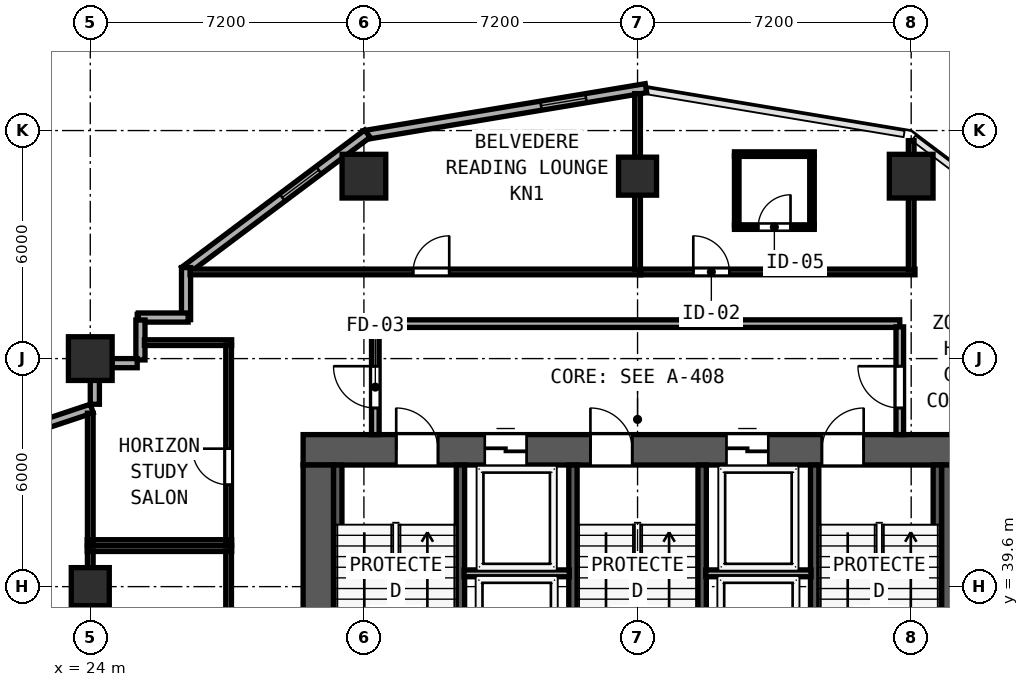
"""IFC4 building model, lengths in metres.
Left out: names, types, materials, properties, quantities, classifications, styles, units other than length and angle.
Written with IfcOpenShell. Run it as: python <this file> out.ifc"""

import sys

from ifc_helpers import new_model, si_unit, direction, frame, frame_2d, origin, origin_2d, place, context, subcontext, project, spatial, rectangle, hollow_rectangle, extrude, element, fill, save


model = new_model("IFC4")
c1 = context("Model", 3, precision=1e-05, world=origin(), true_north=direction((0.0, 1.0)))
c2 = subcontext(c1, "Body", "Model", "MODEL_VIEW")
j1 = project(units=[si_unit("LENGTHUNIT", "METRE"), si_unit("PLANEANGLEUNIT", "RADIAN")], contexts=[c1])
p1 = place(None, origin())
s1 = spatial("IfcSite", under=j1, at=p1, CompositionType="ELEMENT")
p2 = place(p1, origin())
s2 = spatial("IfcBuilding", under=s1, at=p2, CompositionType="ELEMENT")
p3 = place(p2, frame((0.0, 0.0, 70.4)))
s3 = spatial("IfcBuildingStorey", under=s2, at=p3, CompositionType="ELEMENT", Elevation=70.4)
p4 = place(p3, frame((29.6, 43.2, 0.0), z_axis=(0.0, 0.0, 1.0), x_axis=(1.0, 0.0, 0.0)))
e1 = element("IfcWall", 1, at=p4, inside=s3, PredefinedType="SHEAR", context=c2, shape_type="SweptSolid", body=[
    extrude(rectangle(XDim=17.6, YDim=0.8, at=frame_2d((8.8, 0.0))), origin(), (0.0, 0.0, 1.0), 3.6),
])
p5 = place(p4, frame((2.45, 0.0, 0.0)))
e2 = element("IfcOpeningElement", 2, at=p5, cuts=e1, PredefinedType="OPENING", context=c2, shape_type="SweptSolid", body=[
    extrude(rectangle(XDim=1.1, YDim=2.15, at=frame_2d((0.55, 1.075))), frame((0.0, 0.41, 0.0), z_axis=(0.0, -1.0, 0.0), x_axis=(1.0, 0.0, 0.0)), (0.0, 0.0, 1.0), 0.82),
])
p6 = place(p4, frame((7.56, 0.0, 0.0)))
e3 = element("IfcOpeningElement", 3, at=p6, cuts=e1, PredefinedType="OPENING", context=c2, shape_type="SweptSolid", body=[
    extrude(rectangle(XDim=1.1, YDim=2.15, at=frame_2d((0.55, 1.075))), frame((0.0, 0.41, 0.0), z_axis=(0.0, -1.0, 0.0), x_axis=(1.0, 0.0, 0.0)), (0.0, 0.0, 1.0), 0.82),
])
p7 = place(p4, frame((13.65, 0.0, 0.0)))
e4 = element("IfcOpeningElement", 4, at=p7, cuts=e1, PredefinedType="OPENING", context=c2, shape_type="SweptSolid", body=[
    extrude(rectangle(XDim=1.1, YDim=2.15, at=frame_2d((0.55, 1.075))), frame((0.0, 0.41, 0.0), z_axis=(0.0, -1.0, 0.0), x_axis=(1.0, 0.0, 0.0)), (0.0, 0.0, 1.0), 0.82),
])
p8 = place(p4, frame((4.78, 0.0, 0.0)))
e5 = element("IfcOpeningElement", 5, at=p8, cuts=e1, PredefinedType="OPENING", context=c2, shape_type="SweptSolid", body=[
    extrude(rectangle(XDim=1.1, YDim=2.2, at=frame_2d((0.55, 1.1))), frame((0.0, 0.41, 0.0), z_axis=(0.0, -1.0, 0.0), x_axis=(1.0, 0.0, 0.0)), (0.0, 0.0, 1.0), 0.82),
])
p9 = place(p4, frame((11.14, 0.0, 0.0)))
e6 = element("IfcOpeningElement", 6, at=p9, cuts=e1, PredefinedType="OPENING", context=c2, shape_type="SweptSolid", body=[
    extrude(rectangle(XDim=1.1, YDim=2.2, at=frame_2d((0.55, 1.1))), frame((0.0, 0.41, 0.0), z_axis=(0.0, -1.0, 0.0), x_axis=(1.0, 0.0, 0.0)), (0.0, 0.0, 1.0), 0.82),
])
for number, where, z_axis, x_axis in (
    (7, (30.0, 32.8, 0.0), (0.0, 0.0, 1.0), (0.0, 1.0, 0.0)),
    (8, (46.8, 32.8, 0.0), (0.0, 0.0, 1.0), (0.0, 1.0, 0.0)),
):
    element("IfcWall", number, at=place(p3, frame(where, z_axis=z_axis, x_axis=x_axis)), inside=s3, PredefinedType="SHEAR", context=c2, shape_type="SweptSolid", body=[
        extrude(rectangle(XDim=10.0, YDim=0.8, at=frame_2d((5.0, 0.0))), origin(), (0.0, 0.0, 1.0), 3.6),
    ])
for number, where, z_axis, x_axis in (
    (9, (30.512, 35.39, 0.0), (0.0, 0.0, 1.0), (0.0, 1.0, 0.0)),
    (10, (33.74, 35.39, 0.0), (0.0, 0.0, 1.0), (0.0, 1.0, 0.0)),
    (11, (36.7, 35.39, 0.0), (0.0, 0.0, 1.0), (0.0, 1.0, 0.0)),
    (12, (40.1, 35.39, 0.0), (0.0, 0.0, 1.0), (0.0, 1.0, 0.0)),
    (13, (43.06, 35.39, 0.0), (0.0, 0.0, 1.0), (0.0, 1.0, 0.0)),
    (14, (46.288, 35.39, 0.0), (0.0, 0.0, 1.0), (0.0, 1.0, 0.0)),
):
    element("IfcWall", number, at=place(p3, frame(where, z_axis=z_axis, x_axis=x_axis)), inside=s3, PredefinedType="SHEAR", context=c2, shape_type="SweptSolid", body=[
        extrude(rectangle(XDim=7.41, YDim=0.22, at=frame_2d((3.705, 0.0))), origin(), (0.0, 0.0, 1.0), 3.6),
    ])
for number, where, z_axis, x_axis in (
    (15, (24.0, 45.6, 0.0), (0.0, 0.0, 1.0), (1.0, 0.0, 0.0)),
    (16, (31.2, 50.4, 0.0), (0.0, 0.0, 1.0), (1.0, 0.0, 0.0)),
    (17, (45.6, 50.4, 0.0), (0.0, 0.0, 1.0), (1.0, 0.0, 0.0)),
):
    element("IfcColumn", number, at=place(p3, frame(where, z_axis=z_axis, x_axis=x_axis)), inside=s3, PredefinedType="COLUMN", context=c2, shape_type="SweptSolid", body=[
        extrude(hollow_rectangle(XDim=1.15, YDim=1.15, WallThickness=0.042, at=origin_2d()), origin(), (0.0, 0.0, 1.0), 3.8),
    ])
for number, where, z_axis, x_axis in (
    (18, (24.0, 39.6, 0.0), (0.0, 0.0, 1.0), (1.0, 0.0, 0.0)),
    (19, (38.4, 50.4, 0.0), (0.0, 0.0, 1.0), (1.0, 0.0, 0.0)),
):
    element("IfcColumn", number, at=place(p3, frame(where, z_axis=z_axis, x_axis=x_axis)), inside=s3, PredefinedType="COLUMN", context=c2, shape_type="SweptSolid", body=[
        extrude(hollow_rectangle(XDim=1.0, YDim=1.0, WallThickness=0.038, at=origin_2d()), origin(), (0.0, 0.0, 1.0), 3.8),
    ])
p10 = place(p3, frame((38.622, 52.715, 0.0), z_axis=(0.0, 0.0, 1.0), x_axis=(-0.98639129485, -0.164414760418, 0.0)))
e20 = element("IfcWall", 20, at=p10, inside=s3, PredefinedType="SOLIDWALL", context=c2, shape_type="SweptSolid", body=[
    extrude(rectangle(XDim=7.53, YDim=0.24, at=frame_2d((3.765, 0.0))), origin(), (0.0, 0.0, 1.0), 3.6),
])
p11 = place(p10, frame((1.6, 0.0, 0.85)))
e21 = element("IfcOpeningElement", 21, at=p11, cuts=e20, PredefinedType="OPENING", context=c2, shape_type="SweptSolid", body=[
    extrude(rectangle(XDim=1.2, YDim=1.85, at=frame_2d((0.6, 0.925))), frame((0.0, 0.13, 0.0), z_axis=(0.0, -1.0, 0.0), x_axis=(1.0, 0.0, 0.0)), (0.0, 0.0, 1.0), 0.26),
])
p12 = place(p3, frame((31.292, 51.519, 0.0), z_axis=(0.0, 0.0, 1.0), x_axis=(-0.8, -0.6, 0.0)))
e22 = element("IfcWall", 22, at=p12, inside=s3, PredefinedType="SOLIDWALL", context=c2, shape_type="SweptSolid", body=[
    extrude(rectangle(XDim=6.021, YDim=0.24, at=frame_2d((3.01, 0.0))), origin(), (0.0, 0.0, 1.0), 3.6),
])
p13 = place(p12, frame((1.6, 0.0, 0.85)))
e23 = element("IfcOpeningElement", 23, at=p13, cuts=e22, PredefinedType="OPENING", context=c2, shape_type="SweptSolid", body=[
    extrude(rectangle(XDim=1.2, YDim=1.85, at=frame_2d((0.6, 0.925))), frame((0.0, 0.13, 0.0), z_axis=(0.0, -1.0, 0.0), x_axis=(1.0, 0.0, 0.0)), (0.0, 0.0, 1.0), 0.26),
])
p14 = place(p3, frame((26.52, 47.995, 0.0), z_axis=(0.0, 0.0, 1.0), x_axis=(0.0, -1.0, 0.0)))
e24 = element("IfcWall", 24, at=p14, inside=s3, PredefinedType="SOLIDWALL", context=c2, shape_type="SweptSolid", body=[
    extrude(rectangle(XDim=1.37, YDim=0.24, at=frame_2d((0.685, 0.0))), origin(), (0.0, 0.0, 1.0), 3.6),
])
p15 = place(p3, frame((26.575, 46.68, 0.0), z_axis=(0.0, 0.0, 1.0), x_axis=(-1.0, 0.0, 0.0)))
e25 = element("IfcWall", 25, at=p15, inside=s3, PredefinedType="SOLIDWALL", context=c2, shape_type="SweptSolid", body=[
    extrude(rectangle(XDim=1.31, YDim=0.24, at=frame_2d((0.655, 0.0))), origin(), (0.0, 0.0, 1.0), 3.6),
])
p16 = place(p3, frame((25.32, 46.615, 0.0), z_axis=(0.0, 0.0, 1.0), x_axis=(0.0, -1.0, 0.0)))
e26 = element("IfcWall", 26, at=p16, inside=s3, PredefinedType="SOLIDWALL", context=c2, shape_type="SweptSolid", body=[
    extrude(rectangle(XDim=1.05, YDim=0.24, at=frame_2d((0.525, 0.0))), origin(), (0.0, 0.0, 1.0), 3.6),
])
p17 = place(p3, frame((25.235, 45.48, 0.0), z_axis=(0.0, 0.0, 1.0), x_axis=(-1.0, 0.0, 0.0)))
e27 = element("IfcWall", 27, at=p17, inside=s3, PredefinedType="SOLIDWALL", context=c2, shape_type="SweptSolid", body=[
    extrude(rectangle(XDim=0.668, YDim=0.24, at=frame_2d((0.334, 0.0))), origin(), (0.0, 0.0, 1.0), 3.6),
])
p18 = place(p3, frame((24.12, 45.033, 0.0), z_axis=(0.0, 0.0, 1.0), x_axis=(0.0, -1.0, 0.0)))
e28 = element("IfcWall", 28, at=p18, inside=s3, PredefinedType="SOLIDWALL", context=c2, shape_type="SweptSolid", body=[
    extrude(rectangle(XDim=0.635, YDim=0.24, at=frame_2d((0.317, 0.0))), origin(), (0.0, 0.0, 1.0), 3.097),
])
p19 = place(p3, frame((24.039, 44.287, 0.0), z_axis=(0.0, 0.0, 1.0), x_axis=(-0.948678995954, -0.316240672014, 0.0)))
e29 = element("IfcWall", 29, at=p19, inside=s3, PredefinedType="SOLIDWALL", context=c2, shape_type="SweptSolid", body=[
    extrude(rectangle(XDim=5.675, YDim=0.24, at=frame_2d((2.837, 0.0))), origin(), (0.0, 0.0, 1.0), 3.097),
])
p20 = place(p19, frame((1.6, 0.0, 0.85)))
e30 = element("IfcOpeningElement", 30, at=p20, cuts=e29, PredefinedType="OPENING", context=c2, shape_type="SweptSolid", body=[
    extrude(rectangle(XDim=1.2, YDim=1.85, at=frame_2d((0.6, 0.925))), frame((0.0, 0.13, 0.0), z_axis=(0.0, -1.0, 0.0), x_axis=(1.0, 0.0, 0.0)), (0.0, 0.0, 1.0), 0.26),
])
p21 = place(p19, frame((3.834, 0.0, 0.85)))
e31 = element("IfcOpeningElement", 31, at=p21, cuts=e29, PredefinedType="OPENING", context=c2, shape_type="SweptSolid", body=[
    extrude(rectangle(XDim=1.2, YDim=1.85, at=frame_2d((0.6, 0.925))), frame((0.0, 0.13, 0.0), z_axis=(0.0, -1.0, 0.0), x_axis=(1.0, 0.0, 0.0)), (0.0, 0.0, 1.0), 0.26),
])
p22 = place(p3, frame((31.5, 46.52, 0.0), z_axis=(0.0, 0.0, 1.0), x_axis=(1.0, 0.0, 0.0)))
e32 = element("IfcWall", 32, at=p22, inside=s3, PredefinedType="SOLIDWALL", context=c2, shape_type="SweptSolid", body=[
    extrude(rectangle(XDim=13.8, YDim=0.2, at=frame_2d((6.9, 0.0))), origin(), (0.0, 0.0, 1.0), 3.6),
])
p23 = place(p3, frame((31.5, 43.6, 0.0), z_axis=(0.0, 0.0, 1.0), x_axis=(0.0, 1.0, 0.0)))
e33 = element("IfcWall", 33, at=p23, inside=s3, PredefinedType="SOLIDWALL", context=c2, shape_type="SweptSolid", body=[
    extrude(rectangle(XDim=2.835, YDim=0.2, at=frame_2d((1.417, 0.0))), origin(), (0.0, 0.0, 1.0), 3.6),
])
p24 = place(p23, frame((1.8, 0.0, 0.0), z_axis=(0.0, 0.0, 1.0), x_axis=(-1.0, 0.0, 0.0)))
e34 = element("IfcOpeningElement", 34, at=p24, cuts=e33, PredefinedType="OPENING", context=c2, shape_type="SweptSolid", body=[
    extrude(rectangle(XDim=1.1, YDim=2.15, at=frame_2d((0.55, 1.075))), frame((0.0, 0.11, 0.0), z_axis=(0.0, -1.0, 0.0), x_axis=(1.0, 0.0, 0.0)), (0.0, 0.0, 1.0), 0.22),
])
p25 = place(p3, frame((45.3, 43.6, 0.0), z_axis=(0.0, 0.0, 1.0), x_axis=(0.0, 1.0, 0.0)))
e35 = element("IfcWall", 35, at=p25, inside=s3, PredefinedType="SOLIDWALL", context=c2, shape_type="SweptSolid", body=[
    extrude(rectangle(XDim=2.835, YDim=0.2, at=frame_2d((1.417, 0.0))), origin(), (0.0, 0.0, 1.0), 3.6),
])
p26 = place(p25, frame((0.7, 0.0, 0.0)))
e36 = element("IfcOpeningElement", 36, at=p26, cuts=e35, PredefinedType="OPENING", context=c2, shape_type="SweptSolid", body=[
    extrude(rectangle(XDim=1.1, YDim=2.15, at=frame_2d((0.55, 1.075))), frame((0.0, 0.11, 0.0), z_axis=(0.0, -1.0, 0.0), x_axis=(1.0, 0.0, 0.0)), (0.0, 0.0, 1.0), 0.22),
])
for number, where, z_axis, x_axis in (
    (37, (33.835, 39.95, 0.0), (0.0, 0.0, 1.0), (1.0, 0.0, 0.0)),
    (38, (40.195, 39.95, 0.0), (0.0, 0.0, 1.0), (1.0, 0.0, 0.0)),
):
    element("IfcWall", number, at=place(p3, frame(where, z_axis=z_axis, x_axis=x_axis)), inside=s3, PredefinedType="SOLIDWALL", context=c2, shape_type="SweptSolid", body=[
        extrude(rectangle(XDim=2.77, YDim=0.18, at=frame_2d((1.385, 0.0))), origin(), (0.0, 0.0, 1.0), 3.6),
    ])
p27 = place(p3, frame((23.92, 40.6, 0.0), z_axis=(0.0, 0.0, 1.0), x_axis=(1.0, 0.0, 0.0)))
e39 = element("IfcWall", 39, at=p27, inside=s3, PredefinedType="PARTITIONING", context=c2, shape_type="SweptSolid", body=[
    extrude(rectangle(XDim=3.8, YDim=0.15, at=frame_2d((1.9, 0.0))), origin(), (0.0, 0.0, 1.0), 3.6),
])
p28 = place(p3, frame((24.0, 36.52, 0.0), z_axis=(0.0, 0.0, 1.0), x_axis=(0.0, 1.0, 0.0)))
e40 = element("IfcWall", 40, at=p28, inside=s3, PredefinedType="PARTITIONING", context=c2, shape_type="SweptSolid", body=[
    extrude(rectangle(XDim=4.02, YDim=0.15, at=frame_2d((2.01, 0.0))), origin(), (0.0, 0.0, 1.0), 3.097),
])
p29 = place(p3, frame((27.64, 36.52, 0.0), z_axis=(0.0, 0.0, 1.0), x_axis=(0.0, 1.0, 0.0)))
e41 = element("IfcWall", 41, at=p29, inside=s3, PredefinedType="PARTITIONING", context=c2, shape_type="SweptSolid", body=[
    extrude(rectangle(XDim=4.02, YDim=0.15, at=frame_2d((2.01, 0.0))), origin(), (0.0, 0.0, 1.0), 3.6),
])
p30 = place(p29, frame((2.01, 0.0, 0.0), z_axis=(0.0, 0.0, 1.0), x_axis=(-1.0, 0.0, 0.0)))
e42 = element("IfcOpeningElement", 42, at=p30, cuts=e41, PredefinedType="OPENING", context=c2, shape_type="SweptSolid", body=[
    extrude(rectangle(XDim=0.95, YDim=2.12, at=frame_2d((0.475, 1.06))), frame((0.0, 0.085, 0.0), z_axis=(0.0, -1.0, 0.0), x_axis=(1.0, 0.0, 0.0)), (0.0, 0.0, 1.0), 0.17),
])
p31 = place(p3, frame((25.425, 46.02, 0.0), z_axis=(0.0, 0.0, 1.0), x_axis=(1.0, 0.0, 0.0)))
e43 = element("IfcWall", 43, at=p31, inside=s3, PredefinedType="PARTITIONING", context=c2, shape_type="SweptSolid", body=[
    extrude(rectangle(XDim=2.295, YDim=0.15, at=frame_2d((1.147, 0.0))), origin(), (0.0, 0.0, 1.0), 3.6),
])
p32 = place(p3, frame((23.92, 40.76, 0.0), z_axis=(0.0, 0.0, 1.0), x_axis=(1.0, 0.0, 0.0)))
e44 = element("IfcWall", 44, at=p32, inside=s3, PredefinedType="PARTITIONING", context=c2, shape_type="SweptSolid", body=[
    extrude(rectangle(XDim=3.8, YDim=0.15, at=frame_2d((1.9, 0.0))), origin(), (0.0, 0.0, 1.0), 3.6),
])
p33 = place(p3, frame((24.0, 40.82, 0.0), z_axis=(0.0, 0.0, 1.0), x_axis=(0.0, 1.0, 0.0)))
e45 = element("IfcWall", 45, at=p33, inside=s3, PredefinedType="PARTITIONING", context=c2, shape_type="SweptSolid", body=[
    extrude(rectangle(XDim=3.343, YDim=0.15, at=frame_2d((1.671, 0.0))), origin(), (0.0, 0.0, 1.0), 3.097),
])
p34 = place(p3, frame((27.64, 40.82, 0.0), z_axis=(0.0, 0.0, 1.0), x_axis=(0.0, 1.0, 0.0)))
e46 = element("IfcWall", 46, at=p34, inside=s3, PredefinedType="PARTITIONING", context=c2, shape_type="SweptSolid", body=[
    extrude(rectangle(XDim=5.14, YDim=0.15, at=frame_2d((2.57, 0.0))), origin(), (0.0, 0.0, 1.0), 3.6),
])
p35 = place(p34, frame((2.41, 0.0, 0.0), z_axis=(0.0, 0.0, 1.0), x_axis=(-1.0, 0.0, 0.0)))
e47 = element("IfcOpeningElement", 47, at=p35, cuts=e46, PredefinedType="OPENING", context=c2, shape_type="SweptSolid", body=[
    extrude(rectangle(XDim=0.95, YDim=2.12, at=frame_2d((0.475, 1.06))), frame((0.0, 0.085, 0.0), z_axis=(0.0, -1.0, 0.0), x_axis=(1.0, 0.0, 0.0)), (0.0, 0.0, 1.0), 0.17),
])
p36 = place(p3, frame((26.625, 47.88, 0.0), z_axis=(0.0, 0.0, 1.0), x_axis=(1.0, 0.0, 0.0)))
e48 = element("IfcWall", 48, at=p36, inside=s3, PredefinedType="PARTITIONING", context=c2, shape_type="SweptSolid", body=[
    extrude(rectangle(XDim=11.855, YDim=0.15, at=frame_2d((5.927, 0.0))), origin(), (0.0, 0.0, 1.0), 3.6),
])
p37 = place(p36, frame((5.87, 0.0, 0.0)))
e49 = element("IfcOpeningElement", 49, at=p37, cuts=e48, PredefinedType="OPENING", context=c2, shape_type="SweptSolid", body=[
    extrude(rectangle(XDim=0.95, YDim=2.12, at=frame_2d((0.475, 1.06))), frame((0.0, 0.085, 0.0), z_axis=(0.0, -1.0, 0.0), x_axis=(1.0, 0.0, 0.0)), (0.0, 0.0, 1.0), 0.17),
])
p38 = place(p3, frame((38.4, 47.94, 0.0), z_axis=(0.0, 0.0, 1.0), x_axis=(0.0, 1.0, 0.0)))
e50 = element("IfcWall", 50, at=p38, inside=s3, PredefinedType="PARTITIONING", context=c2, shape_type="SweptSolid", body=[
    extrude(rectangle(XDim=4.632, YDim=0.15, at=frame_2d((2.316, 0.0))), origin(), (0.0, 0.0, 1.0), 3.6),
])
p39 = place(p3, frame((38.482, 47.88, 0.0), z_axis=(0.0, 0.0, 1.0), x_axis=(1.0, 0.0, 0.0)))
e51 = element("IfcWall", 51, at=p39, inside=s3, PredefinedType="PARTITIONING", context=c2, shape_type="SweptSolid", body=[
    extrude(rectangle(XDim=7.218, YDim=0.15, at=frame_2d((3.609, 0.0))), origin(), (0.0, 0.0, 1.0), 3.6),
])
p40 = place(p39, frame((1.385, 0.0, 0.0)))
e52 = element("IfcOpeningElement", 52, at=p40, cuts=e51, PredefinedType="OPENING", context=c2, shape_type="SweptSolid", body=[
    extrude(rectangle(XDim=0.95, YDim=2.15, at=frame_2d((0.475, 1.075))), frame((0.0, 0.085, 0.0), z_axis=(0.0, -1.0, 0.0), x_axis=(1.0, 0.0, 0.0)), (0.0, 0.0, 1.0), 0.17),
])
p41 = place(p3, frame((45.6, 47.94, 0.0), z_axis=(0.0, 0.0, 1.0), x_axis=(0.0, 1.0, 0.0)))
e53 = element("IfcWall", 53, at=p41, inside=s3, PredefinedType="PARTITIONING", context=c2, shape_type="SweptSolid", body=[
    extrude(rectangle(XDim=3.395, YDim=0.15, at=frame_2d((1.698, 0.0))), origin(), (0.0, 0.0, 1.0), 2.985),
])
p42 = place(p3, frame((40.95, 50.98, 0.0), z_axis=(0.0, 0.0, 1.0), x_axis=(1.0, 0.0, 0.0)))
e54 = element("IfcWall", 54, at=p42, inside=s3, PredefinedType="PARTITIONING", context=c2, shape_type="SweptSolid", body=[
    extrude(rectangle(XDim=2.1, YDim=0.12, at=frame_2d((1.05, 0.0))), origin(), (0.0, 0.0, 1.0), 3.6),
])
p43 = place(p3, frame((40.95, 49.06, 0.0), z_axis=(0.0, 0.0, 1.0), x_axis=(1.0, 0.0, 0.0)))
e55 = element("IfcWall", 55, at=p43, inside=s3, PredefinedType="PARTITIONING", context=c2, shape_type="SweptSolid", body=[
    extrude(rectangle(XDim=2.1, YDim=0.12, at=frame_2d((1.05, 0.0))), origin(), (0.0, 0.0, 1.0), 3.6),
])
p44 = place(p43, frame((0.625, 0.0, 0.0)))
e56 = element("IfcOpeningElement", 56, at=p44, cuts=e55, PredefinedType="OPENING", context=c2, shape_type="SweptSolid", body=[
    extrude(rectangle(XDim=0.85, YDim=2.1, at=frame_2d((0.425, 1.05))), frame((0.0, 0.07, 0.0), z_axis=(0.0, -1.0, 0.0), x_axis=(1.0, 0.0, 0.0)), (0.0, 0.0, 1.0), 0.14),
])
for number, where, z_axis, x_axis in (
    (57, (41.01, 49.105, 0.0), (0.0, 0.0, 1.0), (0.0, 1.0, 0.0)),
    (58, (42.99, 49.105, 0.0), (0.0, 0.0, 1.0), (0.0, 1.0, 0.0)),
):
    element("IfcWall", number, at=place(p3, frame(where, z_axis=z_axis, x_axis=x_axis)), inside=s3, PredefinedType="PARTITIONING", context=c2, shape_type="SweptSolid", body=[
        extrude(rectangle(XDim=1.83, YDim=0.12, at=frame_2d((0.915, 0.0))), origin(), (0.0, 0.0, 1.0), 3.6),
    ])
p45 = place(p11, origin())
e59 = element("IfcWindow", 59, at=p45, inside=s3, PartitioningType="SINGLE_PANEL", PredefinedType="WINDOW", context=c2, shape_type="SweptSolid", body=[
    extrude(rectangle(XDim=1.2, YDim=1.85, at=frame_2d((0.6, 0.925))), frame((0.0, 0.03, 0.0), z_axis=(0.0, -1.0, 0.0), x_axis=(1.0, 0.0, 0.0)), (0.0, 0.0, 1.0), 0.06),
])
fill(e21, e59)
p46 = place(p13, origin())
e60 = element("IfcWindow", 60, at=p46, inside=s3, PartitioningType="SINGLE_PANEL", PredefinedType="WINDOW", context=c2, shape_type="SweptSolid", body=[
    extrude(rectangle(XDim=1.2, YDim=1.85, at=frame_2d((0.6, 0.925))), frame((0.0, 0.03, 0.0), z_axis=(0.0, -1.0, 0.0), x_axis=(1.0, 0.0, 0.0)), (0.0, 0.0, 1.0), 0.06),
])
fill(e23, e60)
p47 = place(p5, origin())
e61 = element("IfcDoor", 61, at=p47, inside=s3, OperationType="SINGLE_SWING_LEFT", PredefinedType="DOOR", context=c2, shape_type="SweptSolid", body=[
    extrude(rectangle(XDim=1.1, YDim=2.15, at=frame_2d((0.55, 1.075))), frame((0.0, 0.185, 0.0), z_axis=(0.0, -1.0, 0.0), x_axis=(1.0, 0.0, 0.0)), (0.0, 0.0, 1.0), 0.05),
])
fill(e2, e61)
p48 = place(p6, origin())
e62 = element("IfcDoor", 62, at=p48, inside=s3, OperationType="SINGLE_SWING_LEFT", PredefinedType="DOOR", context=c2, shape_type="SweptSolid", body=[
    extrude(rectangle(XDim=1.1, YDim=2.15, at=frame_2d((0.55, 1.075))), frame((0.0, 0.185, 0.0), z_axis=(0.0, -1.0, 0.0), x_axis=(1.0, 0.0, 0.0)), (0.0, 0.0, 1.0), 0.05),
])
fill(e3, e62)
p49 = place(p7, origin())
e63 = element("IfcDoor", 63, at=p49, inside=s3, OperationType="SINGLE_SWING_RIGHT", PredefinedType="DOOR", context=c2, shape_type="SweptSolid", body=[
    extrude(rectangle(XDim=1.1, YDim=2.15, at=frame_2d((0.55, 1.075))), frame((0.0, 0.185, 0.0), z_axis=(0.0, -1.0, 0.0), x_axis=(1.0, 0.0, 0.0)), (0.0, 0.0, 1.0), 0.05),
])
fill(e4, e63)
p50 = place(p24, origin())
e64 = element("IfcDoor", 64, at=p50, inside=s3, OperationType="SINGLE_SWING_LEFT", PredefinedType="DOOR", context=c2, shape_type="SweptSolid", body=[
    extrude(rectangle(XDim=1.1, YDim=2.15, at=frame_2d((0.55, 1.075))), frame((0.0, 0.025, 0.0), z_axis=(0.0, -1.0, 0.0), x_axis=(1.0, 0.0, 0.0)), (0.0, 0.0, 1.0), 0.05),
])
fill(e34, e64)
p51 = place(p26, origin())
e65 = element("IfcDoor", 65, at=p51, inside=s3, OperationType="SINGLE_SWING_RIGHT", PredefinedType="DOOR", context=c2, shape_type="SweptSolid", body=[
    extrude(rectangle(XDim=1.1, YDim=2.15, at=frame_2d((0.55, 1.075))), frame((0.0, 0.025, 0.0), z_axis=(0.0, -1.0, 0.0), x_axis=(1.0, 0.0, 0.0)), (0.0, 0.0, 1.0), 0.05),
])
fill(e36, e65)
p52 = place(p8, origin())
e66 = element("IfcDoor", 66, at=p52, inside=s3, OperationType="SLIDING_TO_LEFT", PredefinedType="DOOR", context=c2, shape_type="SweptSolid", body=[
    extrude(rectangle(XDim=1.1, YDim=2.2, at=frame_2d((0.55, 1.1))), frame((0.0, 0.185, 0.0), z_axis=(0.0, -1.0, 0.0), x_axis=(1.0, 0.0, 0.0)), (0.0, 0.0, 1.0), 0.05),
])
fill(e5, e66)
p53 = place(p9, origin())
e67 = element("IfcDoor", 67, at=p53, inside=s3, OperationType="SLIDING_TO_LEFT", PredefinedType="DOOR", context=c2, shape_type="SweptSolid", body=[
    extrude(rectangle(XDim=1.1, YDim=2.2, at=frame_2d((0.55, 1.1))), frame((0.0, 0.185, 0.0), z_axis=(0.0, -1.0, 0.0), x_axis=(1.0, 0.0, 0.0)), (0.0, 0.0, 1.0), 0.05),
])
fill(e6, e67)
p54 = place(p35, origin())
e68 = element("IfcDoor", 68, at=p54, inside=s3, OperationType="SINGLE_SWING_LEFT", PredefinedType="DOOR", context=c2, shape_type="SweptSolid", body=[
    extrude(rectangle(XDim=0.95, YDim=2.12, at=frame_2d((0.475, 1.06))), frame((0.0, 0.025, 0.0), z_axis=(0.0, -1.0, 0.0), x_axis=(1.0, 0.0, 0.0)), (0.0, 0.0, 1.0), 0.05),
])
fill(e47, e68)
p55 = place(p37, origin())
e69 = element("IfcDoor", 69, at=p55, inside=s3, OperationType="SINGLE_SWING_RIGHT", PredefinedType="DOOR", context=c2, shape_type="SweptSolid", body=[
    extrude(rectangle(XDim=0.95, YDim=2.12, at=frame_2d((0.475, 1.06))), frame((0.0, 0.025, 0.0), z_axis=(0.0, -1.0, 0.0), x_axis=(1.0, 0.0, 0.0)), (0.0, 0.0, 1.0), 0.05),
])
fill(e49, e69)
p56 = place(p40, origin())
e70 = element("IfcDoor", 70, at=p56, inside=s3, OperationType="SINGLE_SWING_LEFT", PredefinedType="DOOR", context=c2, shape_type="SweptSolid", body=[
    extrude(rectangle(XDim=0.95, YDim=2.15, at=frame_2d((0.475, 1.075))), frame((0.0, 0.025, 0.0), z_axis=(0.0, -1.0, 0.0), x_axis=(1.0, 0.0, 0.0)), (0.0, 0.0, 1.0), 0.05),
])
fill(e52, e70)
p57 = place(p44, origin())
e71 = element("IfcDoor", 71, at=p57, inside=s3, OperationType="SINGLE_SWING_RIGHT", PredefinedType="DOOR", context=c2, shape_type="SweptSolid", body=[
    extrude(rectangle(XDim=0.85, YDim=2.1, at=frame_2d((0.425, 1.05))), frame((0.0, 0.025, 0.0), z_axis=(0.0, -1.0, 0.0), x_axis=(1.0, 0.0, 0.0)), (0.0, 0.0, 1.0), 0.05),
])
fill(e56, e71)
save(model, sys.argv[1])
